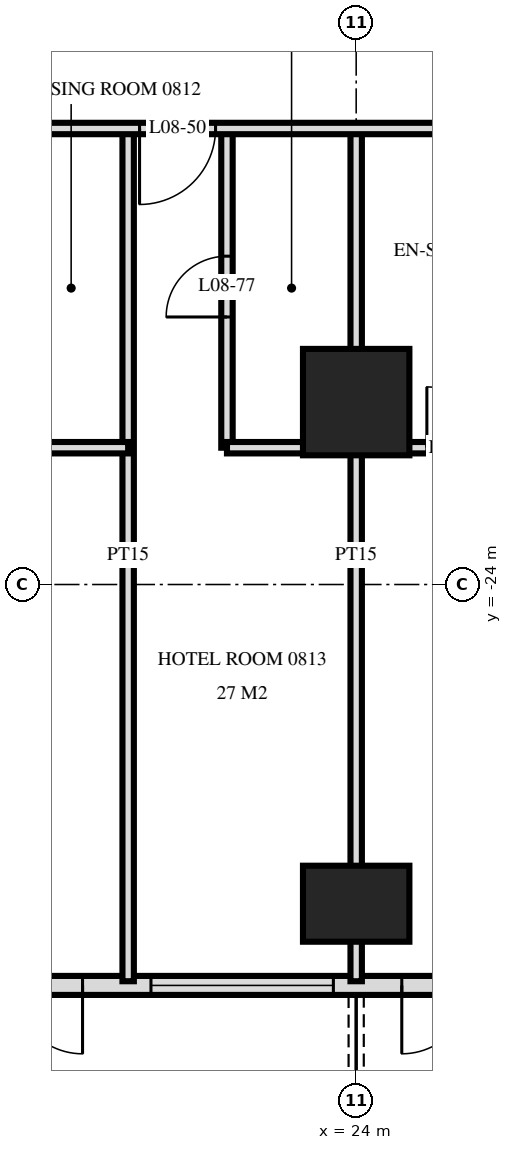
"""IFC4 building model, lengths in metres.
Left out: names, types, materials, properties, quantities, classifications, styles, units other than length and angle.
Written with IfcOpenShell. Run it as: python <this file> out.ifc"""

import sys

from ifc_helpers import new_model, si_unit, direction, frame, frame_2d, origin, origin_2d, place, context, subcontext, project, spatial, rectangle, extrude, element, fill, save


model = new_model("IFC4")
c1 = context("Model", 3, precision=1e-05, world=origin(), true_north=direction((0.0, 1.0)))
c2 = subcontext(c1, "Body", "Model", "MODEL_VIEW")
j1 = project(units=[si_unit("LENGTHUNIT", "METRE"), si_unit("PLANEANGLEUNIT", "RADIAN")], contexts=[c1])
p1 = place(None, origin())
s1 = spatial("IfcSite", under=j1, at=p1, CompositionType="ELEMENT")
p2 = place(p1, origin())
s2 = spatial("IfcBuilding", under=s1, at=p2, CompositionType="ELEMENT")
p3 = place(p2, frame((0.0, 0.0, 38.4)))
s3 = spatial("IfcBuildingStorey", under=s2, at=p3, CompositionType="ELEMENT", Elevation=38.4)
p4 = place(p3, frame((24.0, -28.2, 0.0), z_axis=(0.0, 0.0, 1.0), x_axis=(1.0, 0.0, 0.0)))
e1 = element("IfcColumn", 1, at=p4, inside=s3, PredefinedType="COLUMN", context=c2, shape_type="SweptSolid", body=[
    extrude(rectangle(XDim=1.4, YDim=1.0, at=origin_2d()), origin(), (0.0, 0.0, 1.0), 3.6),
])
p5 = place(p3, frame((24.0, -21.6, 0.0), z_axis=(0.0, 0.0, 1.0), x_axis=(1.0, 0.0, 0.0)))
e2 = element("IfcColumn", 2, at=p5, inside=s3, PredefinedType="COLUMN", context=c2, shape_type="SweptSolid", body=[
    extrude(rectangle(XDim=1.4, YDim=1.4, at=origin_2d()), origin(), (0.0, 0.0, 1.0), 3.6),
])
p6 = place(p3, frame((-28.775, -29.275, 0.0), z_axis=(0.0, 0.0, 1.0), x_axis=(1.0, 0.0, 0.0)))
e3 = element("IfcWall", 3, at=p6, inside=s3, PredefinedType="SOLIDWALL", context=c2, shape_type="SweptSolid", body=[
    extrude(rectangle(XDim=57.551, YDim=0.25, at=frame_2d((28.775, 0.0))), origin(), (0.0, 0.0, 1.0), 3.32),
])
p7 = place(p6, frame((0.575, 0.0, 0.0)))
e4 = element("IfcOpeningElement", 4, at=p7, cuts=e3, PredefinedType="OPENING", context=c2, shape_type="SweptSolid", body=[
    extrude(rectangle(XDim=1.8, YDim=2.4, at=frame_2d((0.9, 1.2))), frame((0.0, 0.135, 0.0), z_axis=(0.0, -1.0, 0.0), x_axis=(1.0, 0.0, 0.0)), (0.0, 0.0, 1.0), 0.27),
])
p8 = place(p6, frame((5.375, 0.0, 0.0)))
e5 = element("IfcOpeningElement", 5, at=p8, cuts=e3, PredefinedType="OPENING", context=c2, shape_type="SweptSolid", body=[
    extrude(rectangle(XDim=1.8, YDim=2.4, at=frame_2d((0.9, 1.2))), frame((0.0, 0.135, 0.0), z_axis=(0.0, -1.0, 0.0), x_axis=(1.0, 0.0, 0.0)), (0.0, 0.0, 1.0), 0.27),
])
p9 = place(p6, frame((8.075, 0.0, 0.3)))
e6 = element("IfcOpeningElement", 6, at=p9, cuts=e3, PredefinedType="OPENING", context=c2, shape_type="SweptSolid", body=[
    extrude(rectangle(XDim=2.4, YDim=2.1, at=frame_2d((1.2, 1.05))), frame((0.0, 0.135, 0.0), z_axis=(0.0, -1.0, 0.0), x_axis=(1.0, 0.0, 0.0)), (0.0, 0.0, 1.0), 0.27),
])
p10 = place(p6, frame((11.375, 0.0, 0.0)))
e7 = element("IfcOpeningElement", 7, at=p10, cuts=e3, PredefinedType="OPENING", context=c2, shape_type="SweptSolid", body=[
    extrude(rectangle(XDim=1.8, YDim=2.4, at=frame_2d((0.9, 1.2))), frame((0.0, 0.135, 0.0), z_axis=(0.0, -1.0, 0.0), x_axis=(1.0, 0.0, 0.0)), (0.0, 0.0, 1.0), 0.27),
])
p11 = place(p6, frame((14.075, 0.0, 0.3)))
e8 = element("IfcOpeningElement", 8, at=p11, cuts=e3, PredefinedType="OPENING", context=c2, shape_type="SweptSolid", body=[
    extrude(rectangle(XDim=2.4, YDim=2.1, at=frame_2d((1.2, 1.05))), frame((0.0, 0.135, 0.0), z_axis=(0.0, -1.0, 0.0), x_axis=(1.0, 0.0, 0.0)), (0.0, 0.0, 1.0), 0.27),
])
p12 = place(p6, frame((17.375, 0.0, 0.0)))
e9 = element("IfcOpeningElement", 9, at=p12, cuts=e3, PredefinedType="OPENING", context=c2, shape_type="SweptSolid", body=[
    extrude(rectangle(XDim=1.8, YDim=2.4, at=frame_2d((0.9, 1.2))), frame((0.0, 0.135, 0.0), z_axis=(0.0, -1.0, 0.0), x_axis=(1.0, 0.0, 0.0)), (0.0, 0.0, 1.0), 0.27),
])
p13 = place(p6, frame((20.075, 0.0, 0.3)))
e10 = element("IfcOpeningElement", 10, at=p13, cuts=e3, PredefinedType="OPENING", context=c2, shape_type="SweptSolid", body=[
    extrude(rectangle(XDim=2.4, YDim=2.1, at=frame_2d((1.2, 1.05))), frame((0.0, 0.135, 0.0), z_axis=(0.0, -1.0, 0.0), x_axis=(1.0, 0.0, 0.0)), (0.0, 0.0, 1.0), 0.27),
])
p14 = place(p6, frame((23.075, 0.0, 0.3)))
e11 = element("IfcOpeningElement", 11, at=p14, cuts=e3, PredefinedType="OPENING", context=c2, shape_type="SweptSolid", body=[
    extrude(rectangle(XDim=2.4, YDim=2.1, at=frame_2d((1.2, 1.05))), frame((0.0, 0.135, 0.0), z_axis=(0.0, -1.0, 0.0), x_axis=(1.0, 0.0, 0.0)), (0.0, 0.0, 1.0), 0.27),
])
p15 = place(p6, frame((26.375, 0.0, 0.0)))
e12 = element("IfcOpeningElement", 12, at=p15, cuts=e3, PredefinedType="OPENING", context=c2, shape_type="SweptSolid", body=[
    extrude(rectangle(XDim=1.8, YDim=2.4, at=frame_2d((0.9, 1.2))), frame((0.0, 0.135, 0.0), z_axis=(0.0, -1.0, 0.0), x_axis=(1.0, 0.0, 0.0)), (0.0, 0.0, 1.0), 0.27),
])
p16 = place(p6, frame((29.375, 0.0, 0.0)))
e13 = element("IfcOpeningElement", 13, at=p16, cuts=e3, PredefinedType="OPENING", context=c2, shape_type="SweptSolid", body=[
    extrude(rectangle(XDim=1.8, YDim=2.4, at=frame_2d((0.9, 1.2))), frame((0.0, 0.135, 0.0), z_axis=(0.0, -1.0, 0.0), x_axis=(1.0, 0.0, 0.0)), (0.0, 0.0, 1.0), 0.27),
])
p17 = place(p6, frame((32.075, 0.0, 0.3)))
e14 = element("IfcOpeningElement", 14, at=p17, cuts=e3, PredefinedType="OPENING", context=c2, shape_type="SweptSolid", body=[
    extrude(rectangle(XDim=2.4, YDim=2.1, at=frame_2d((1.2, 1.05))), frame((0.0, 0.135, 0.0), z_axis=(0.0, -1.0, 0.0), x_axis=(1.0, 0.0, 0.0)), (0.0, 0.0, 1.0), 0.27),
])
p18 = place(p6, frame((35.375, 0.0, 0.0)))
e15 = element("IfcOpeningElement", 15, at=p18, cuts=e3, PredefinedType="OPENING", context=c2, shape_type="SweptSolid", body=[
    extrude(rectangle(XDim=1.8, YDim=2.4, at=frame_2d((0.9, 1.2))), frame((0.0, 0.135, 0.0), z_axis=(0.0, -1.0, 0.0), x_axis=(1.0, 0.0, 0.0)), (0.0, 0.0, 1.0), 0.27),
])
p19 = place(p6, frame((38.075, 0.0, 0.3)))
e16 = element("IfcOpeningElement", 16, at=p19, cuts=e3, PredefinedType="OPENING", context=c2, shape_type="SweptSolid", body=[
    extrude(rectangle(XDim=2.4, YDim=2.1, at=frame_2d((1.2, 1.05))), frame((0.0, 0.135, 0.0), z_axis=(0.0, -1.0, 0.0), x_axis=(1.0, 0.0, 0.0)), (0.0, 0.0, 1.0), 0.27),
])
p20 = place(p6, frame((41.375, 0.0, 0.0)))
e17 = element("IfcOpeningElement", 17, at=p20, cuts=e3, PredefinedType="OPENING", context=c2, shape_type="SweptSolid", body=[
    extrude(rectangle(XDim=1.8, YDim=2.4, at=frame_2d((0.9, 1.2))), frame((0.0, 0.135, 0.0), z_axis=(0.0, -1.0, 0.0), x_axis=(1.0, 0.0, 0.0)), (0.0, 0.0, 1.0), 0.27),
])
p21 = place(p6, frame((44.075, 0.0, 0.3)))
e18 = element("IfcOpeningElement", 18, at=p21, cuts=e3, PredefinedType="OPENING", context=c2, shape_type="SweptSolid", body=[
    extrude(rectangle(XDim=2.4, YDim=2.1, at=frame_2d((1.2, 1.05))), frame((0.0, 0.135, 0.0), z_axis=(0.0, -1.0, 0.0), x_axis=(1.0, 0.0, 0.0)), (0.0, 0.0, 1.0), 0.27),
])
p22 = place(p6, frame((47.375, 0.0, 0.0)))
e19 = element("IfcOpeningElement", 19, at=p22, cuts=e3, PredefinedType="OPENING", context=c2, shape_type="SweptSolid", body=[
    extrude(rectangle(XDim=1.8, YDim=2.4, at=frame_2d((0.9, 1.2))), frame((0.0, 0.135, 0.0), z_axis=(0.0, -1.0, 0.0), x_axis=(1.0, 0.0, 0.0)), (0.0, 0.0, 1.0), 0.27),
])
p23 = place(p6, frame((50.075, 0.0, 0.3)))
e20 = element("IfcOpeningElement", 20, at=p23, cuts=e3, PredefinedType="OPENING", context=c2, shape_type="SweptSolid", body=[
    extrude(rectangle(XDim=2.4, YDim=2.1, at=frame_2d((1.2, 1.05))), frame((0.0, 0.135, 0.0), z_axis=(0.0, -1.0, 0.0), x_axis=(1.0, 0.0, 0.0)), (0.0, 0.0, 1.0), 0.27),
])
p24 = place(p6, frame((53.375, 0.0, 0.0)))
e21 = element("IfcOpeningElement", 21, at=p24, cuts=e3, PredefinedType="OPENING", context=c2, shape_type="SweptSolid", body=[
    extrude(rectangle(XDim=1.8, YDim=2.4, at=frame_2d((0.9, 1.2))), frame((0.0, 0.135, 0.0), z_axis=(0.0, -1.0, 0.0), x_axis=(1.0, 0.0, 0.0)), (0.0, 0.0, 1.0), 0.27),
])
p25 = place(p3, frame((24.0, -29.22, 0.0), z_axis=(0.0, 0.0, 1.0), x_axis=(0.0, 1.0, 0.0)))
e22 = element("IfcWall", 22, at=p25, inside=s3, PredefinedType="PARTITIONING", context=c2, shape_type="SweptSolid", body=[
    extrude(rectangle(XDim=11.22, YDim=0.15, at=frame_2d((5.61, 0.0))), origin(), (0.0, 0.0, 1.0), 3.32),
])
p26 = place(p3, frame((22.3, -22.2, 0.0), z_axis=(0.0, 0.0, 1.0), x_axis=(0.0, 1.0, 0.0)))
e23 = element("IfcWall", 23, at=p26, inside=s3, PredefinedType="PARTITIONING", context=c2, shape_type="SweptSolid", body=[
    extrude(rectangle(XDim=4.2, YDim=0.15, at=frame_2d((2.1, 0.0))), origin(), (0.0, 0.0, 1.0), 3.32),
])
p27 = place(p26, frame((1.72, 0.0, 0.0)))
e24 = element("IfcOpeningElement", 24, at=p27, cuts=e23, PredefinedType="OPENING", context=c2, shape_type="SweptSolid", body=[
    extrude(rectangle(XDim=0.8, YDim=2.1, at=frame_2d((0.4, 1.05))), frame((0.0, 0.085, 0.0), z_axis=(0.0, -1.0, 0.0), x_axis=(1.0, 0.0, 0.0)), (0.0, 0.0, 1.0), 0.17),
])
p28 = place(p3, frame((21.0, -29.22, 0.0), z_axis=(0.0, 0.0, 1.0), x_axis=(0.0, 1.0, 0.0)))
e25 = element("IfcWall", 25, at=p28, inside=s3, PredefinedType="PARTITIONING", context=c2, shape_type="SweptSolid", body=[
    extrude(rectangle(XDim=11.22, YDim=0.15, at=frame_2d((5.61, 0.0))), origin(), (0.0, 0.0, 1.0), 3.32),
])
p29 = place(p3, frame((19.5, -22.2, 0.0), z_axis=(0.0, 0.0, 1.0), x_axis=(1.0, 0.0, 0.0)))
e26 = element("IfcWall", 26, at=p29, inside=s3, PredefinedType="PARTITIONING", context=c2, shape_type="SweptSolid", body=[
    extrude(rectangle(XDim=1.5, YDim=0.15, at=frame_2d((0.75, 0.0))), origin(), (0.0, 0.0, 1.0), 3.32),
])
p30 = place(p3, frame((22.3, -22.2, 0.0), z_axis=(0.0, 0.0, 1.0), x_axis=(1.0, 0.0, 0.0)))
e27 = element("IfcWall", 27, at=p30, inside=s3, PredefinedType="PARTITIONING", context=c2, shape_type="SweptSolid", body=[
    extrude(rectangle(XDim=5.9, YDim=0.15, at=frame_2d((2.95, 0.0))), origin(), (0.0, 0.0, 1.0), 3.32),
])
p31 = place(p30, frame((2.63, 0.0, 0.0)))
e28 = element("IfcOpeningElement", 28, at=p31, cuts=e27, PredefinedType="OPENING", context=c2, shape_type="SweptSolid", body=[
    extrude(rectangle(XDim=0.8, YDim=2.1, at=frame_2d((0.4, 1.05))), frame((0.0, 0.085, 0.0), z_axis=(0.0, -1.0, 0.0), x_axis=(1.0, 0.0, 0.0)), (0.0, 0.0, 1.0), 0.17),
])
p32 = place(p3, frame((-33.12, -18.0, 0.0), z_axis=(0.0, 0.0, 1.0), x_axis=(1.0, 0.0, 0.0)))
e29 = element("IfcWall", 29, at=p32, inside=s3, PredefinedType="PARTITIONING", context=c2, shape_type="SweptSolid", body=[
    extrude(rectangle(XDim=66.24, YDim=0.15, at=frame_2d((33.12, 0.0))), origin(), (0.0, 0.0, 1.0), 3.32),
])
p33 = place(p32, frame((12.27, 0.0, 0.0)))
e30 = element("IfcOpeningElement", 30, at=p33, cuts=e29, PredefinedType="OPENING", context=c2, shape_type="SweptSolid", body=[
    extrude(rectangle(XDim=1.0, YDim=2.1, at=frame_2d((0.5, 1.05))), frame((0.0, 0.085, 0.0), z_axis=(0.0, -1.0, 0.0), x_axis=(1.0, 0.0, 0.0)), (0.0, 0.0, 1.0), 0.17),
])
p34 = place(p32, frame((16.97, 0.0, 0.0)))
e31 = element("IfcOpeningElement", 31, at=p34, cuts=e29, PredefinedType="OPENING", context=c2, shape_type="SweptSolid", body=[
    extrude(rectangle(XDim=1.0, YDim=2.1, at=frame_2d((0.5, 1.05))), frame((0.0, 0.085, 0.0), z_axis=(0.0, -1.0, 0.0), x_axis=(1.0, 0.0, 0.0)), (0.0, 0.0, 1.0), 0.17),
])
p35 = place(p32, frame((18.27, 0.0, 0.0)))
e32 = element("IfcOpeningElement", 32, at=p35, cuts=e29, PredefinedType="OPENING", context=c2, shape_type="SweptSolid", body=[
    extrude(rectangle(XDim=1.0, YDim=2.1, at=frame_2d((0.5, 1.05))), frame((0.0, 0.085, 0.0), z_axis=(0.0, -1.0, 0.0), x_axis=(1.0, 0.0, 0.0)), (0.0, 0.0, 1.0), 0.17),
])
p36 = place(p32, frame((22.97, 0.0, 0.0)))
e33 = element("IfcOpeningElement", 33, at=p36, cuts=e29, PredefinedType="OPENING", context=c2, shape_type="SweptSolid", body=[
    extrude(rectangle(XDim=1.0, YDim=2.1, at=frame_2d((0.5, 1.05))), frame((0.0, 0.085, 0.0), z_axis=(0.0, -1.0, 0.0), x_axis=(1.0, 0.0, 0.0)), (0.0, 0.0, 1.0), 0.17),
])
p37 = place(p32, frame((24.27, 0.0, 0.0)))
e34 = element("IfcOpeningElement", 34, at=p37, cuts=e29, PredefinedType="OPENING", context=c2, shape_type="SweptSolid", body=[
    extrude(rectangle(XDim=1.0, YDim=2.1, at=frame_2d((0.5, 1.05))), frame((0.0, 0.085, 0.0), z_axis=(0.0, -1.0, 0.0), x_axis=(1.0, 0.0, 0.0)), (0.0, 0.0, 1.0), 0.17),
])
p38 = place(p32, frame((28.97, 0.0, 0.0)))
e35 = element("IfcOpeningElement", 35, at=p38, cuts=e29, PredefinedType="OPENING", context=c2, shape_type="SweptSolid", body=[
    extrude(rectangle(XDim=1.0, YDim=2.1, at=frame_2d((0.5, 1.05))), frame((0.0, 0.085, 0.0), z_axis=(0.0, -1.0, 0.0), x_axis=(1.0, 0.0, 0.0)), (0.0, 0.0, 1.0), 0.17),
])
p39 = place(p32, frame((30.27, 0.0, 0.0)))
e36 = element("IfcOpeningElement", 36, at=p39, cuts=e29, PredefinedType="OPENING", context=c2, shape_type="SweptSolid", body=[
    extrude(rectangle(XDim=1.0, YDim=2.1, at=frame_2d((0.5, 1.05))), frame((0.0, 0.085, 0.0), z_axis=(0.0, -1.0, 0.0), x_axis=(1.0, 0.0, 0.0)), (0.0, 0.0, 1.0), 0.17),
])
p40 = place(p32, frame((34.97, 0.0, 0.0)))
e37 = element("IfcOpeningElement", 37, at=p40, cuts=e29, PredefinedType="OPENING", context=c2, shape_type="SweptSolid", body=[
    extrude(rectangle(XDim=1.0, YDim=2.1, at=frame_2d((0.5, 1.05))), frame((0.0, 0.085, 0.0), z_axis=(0.0, -1.0, 0.0), x_axis=(1.0, 0.0, 0.0)), (0.0, 0.0, 1.0), 0.17),
])
p41 = place(p32, frame((37.27, 0.0, 0.0)))
e38 = element("IfcOpeningElement", 38, at=p41, cuts=e29, PredefinedType="OPENING", context=c2, shape_type="SweptSolid", body=[
    extrude(rectangle(XDim=1.0, YDim=2.1, at=frame_2d((0.5, 1.05))), frame((0.0, 0.085, 0.0), z_axis=(0.0, -1.0, 0.0), x_axis=(1.0, 0.0, 0.0)), (0.0, 0.0, 1.0), 0.17),
])
p42 = place(p32, frame((43.97, 0.0, 0.0)))
e39 = element("IfcOpeningElement", 39, at=p42, cuts=e29, PredefinedType="OPENING", context=c2, shape_type="SweptSolid", body=[
    extrude(rectangle(XDim=1.0, YDim=2.1, at=frame_2d((0.5, 1.05))), frame((0.0, 0.085, 0.0), z_axis=(0.0, -1.0, 0.0), x_axis=(1.0, 0.0, 0.0)), (0.0, 0.0, 1.0), 0.17),
])
p43 = place(p32, frame((45.27, 0.0, 0.0)))
e40 = element("IfcOpeningElement", 40, at=p43, cuts=e29, PredefinedType="OPENING", context=c2, shape_type="SweptSolid", body=[
    extrude(rectangle(XDim=1.0, YDim=2.1, at=frame_2d((0.5, 1.05))), frame((0.0, 0.085, 0.0), z_axis=(0.0, -1.0, 0.0), x_axis=(1.0, 0.0, 0.0)), (0.0, 0.0, 1.0), 0.17),
])
p44 = place(p32, frame((51.22, 0.0, 0.0)))
e41 = element("IfcOpeningElement", 41, at=p44, cuts=e29, PredefinedType="OPENING", context=c2, shape_type="SweptSolid", body=[
    extrude(rectangle(XDim=1.0, YDim=2.1, at=frame_2d((0.5, 1.05))), frame((0.0, 0.085, 0.0), z_axis=(0.0, -1.0, 0.0), x_axis=(1.0, 0.0, 0.0)), (0.0, 0.0, 1.0), 0.17),
])
p45 = place(p32, frame((54.27, 0.0, 0.0)))
e42 = element("IfcOpeningElement", 42, at=p45, cuts=e29, PredefinedType="OPENING", context=c2, shape_type="SweptSolid", body=[
    extrude(rectangle(XDim=1.0, YDim=2.1, at=frame_2d((0.5, 1.05))), frame((0.0, 0.085, 0.0), z_axis=(0.0, -1.0, 0.0), x_axis=(1.0, 0.0, 0.0)), (0.0, 0.0, 1.0), 0.17),
])
p46 = place(p32, frame((6.07, 0.0, 0.0)))
e43 = element("IfcOpeningElement", 43, at=p46, cuts=e29, PredefinedType="OPENING", context=c2, shape_type="SweptSolid", body=[
    extrude(rectangle(XDim=1.0, YDim=2.1, at=frame_2d((0.5, 1.05))), frame((0.0, 0.085, 0.0), z_axis=(0.0, -1.0, 0.0), x_axis=(1.0, 0.0, 0.0)), (0.0, 0.0, 1.0), 0.17),
])
p47 = place(p32, frame((63.37, 0.0, 0.0)))
e44 = element("IfcOpeningElement", 44, at=p47, cuts=e29, PredefinedType="OPENING", context=c2, shape_type="SweptSolid", body=[
    extrude(rectangle(XDim=1.0, YDim=2.1, at=frame_2d((0.5, 1.05))), frame((0.0, 0.085, 0.0), z_axis=(0.0, -1.0, 0.0), x_axis=(1.0, 0.0, 0.0)), (0.0, 0.0, 1.0), 0.17),
])
p48 = place(p22, frame((0.9, 0.0, 0.0), z_axis=(0.0, 0.0, 1.0), x_axis=(-1.0, 0.0, 0.0)))
e45 = element("IfcDoor", 45, at=p48, inside=s3, OperationType="DOUBLE_DOOR_SINGLE_SWING", PredefinedType="DOOR", context=c2, shape_type="SweptSolid", body=[
    extrude(rectangle(XDim=1.8, YDim=2.4, at=frame_2d((0.0, 1.2))), frame((0.0, -0.025, 0.0), z_axis=(0.0, 1.0, 0.0), x_axis=(-1.0, 0.0, 0.0)), (0.0, 0.0, 1.0), 0.05),
])
fill(e19, e45)
p49 = place(p23, origin())
e46 = element("IfcWindow", 46, at=p49, inside=s3, PartitioningType="SINGLE_PANEL", PredefinedType="WINDOW", context=c2, shape_type="SweptSolid", body=[
    extrude(rectangle(XDim=2.4, YDim=2.1, at=frame_2d((1.2, 1.05))), frame((0.0, 0.03, 0.0), z_axis=(0.0, -1.0, 0.0), x_axis=(1.0, 0.0, 0.0)), (0.0, 0.0, 1.0), 0.06),
])
fill(e20, e46)
p50 = place(p24, frame((0.9, 0.0, 0.0), z_axis=(0.0, 0.0, 1.0), x_axis=(-1.0, 0.0, 0.0)))
e47 = element("IfcDoor", 47, at=p50, inside=s3, OperationType="DOUBLE_DOOR_SINGLE_SWING", PredefinedType="DOOR", context=c2, shape_type="SweptSolid", body=[
    extrude(rectangle(XDim=1.8, YDim=2.4, at=frame_2d((0.0, 1.2))), frame((0.0, -0.025, 0.0), z_axis=(0.0, 1.0, 0.0), x_axis=(-1.0, 0.0, 0.0)), (0.0, 0.0, 1.0), 0.05),
])
fill(e21, e47)
p51 = place(p45, frame((0.5, 0.0, 0.0), z_axis=(0.0, 0.0, 1.0), x_axis=(-1.0, 0.0, 0.0)))
e48 = element("IfcDoor", 48, at=p51, inside=s3, OperationType="SINGLE_SWING_LEFT", PredefinedType="DOOR", context=c2, shape_type="SweptSolid", body=[
    extrude(rectangle(XDim=1.0, YDim=2.1, at=frame_2d((0.0, 1.05))), frame((0.0, -0.025, 0.0), z_axis=(0.0, 1.0, 0.0), x_axis=(-1.0, 0.0, 0.0)), (0.0, 0.0, 1.0), 0.05),
])
fill(e42, e48)
p52 = place(p27, origin())
e49 = element("IfcDoor", 49, at=p52, inside=s3, OperationType="SINGLE_SWING_RIGHT", PredefinedType="DOOR", context=c2, shape_type="SweptSolid", body=[
    extrude(rectangle(XDim=0.8, YDim=2.1, at=frame_2d((0.4, 1.05))), frame((0.0, 0.025, 0.0), z_axis=(0.0, -1.0, 0.0), x_axis=(1.0, 0.0, 0.0)), (0.0, 0.0, 1.0), 0.05),
])
fill(e24, e49)
p53 = place(p31, origin())
e50 = element("IfcDoor", 50, at=p53, inside=s3, OperationType="SINGLE_SWING_RIGHT", PredefinedType="DOOR", context=c2, shape_type="SweptSolid", body=[
    extrude(rectangle(XDim=0.8, YDim=2.1, at=frame_2d((0.4, 1.05))), frame((0.0, 0.025, 0.0), z_axis=(0.0, -1.0, 0.0), x_axis=(1.0, 0.0, 0.0)), (0.0, 0.0, 1.0), 0.05),
])
fill(e28, e50)
save(model, sys.argv[1])
